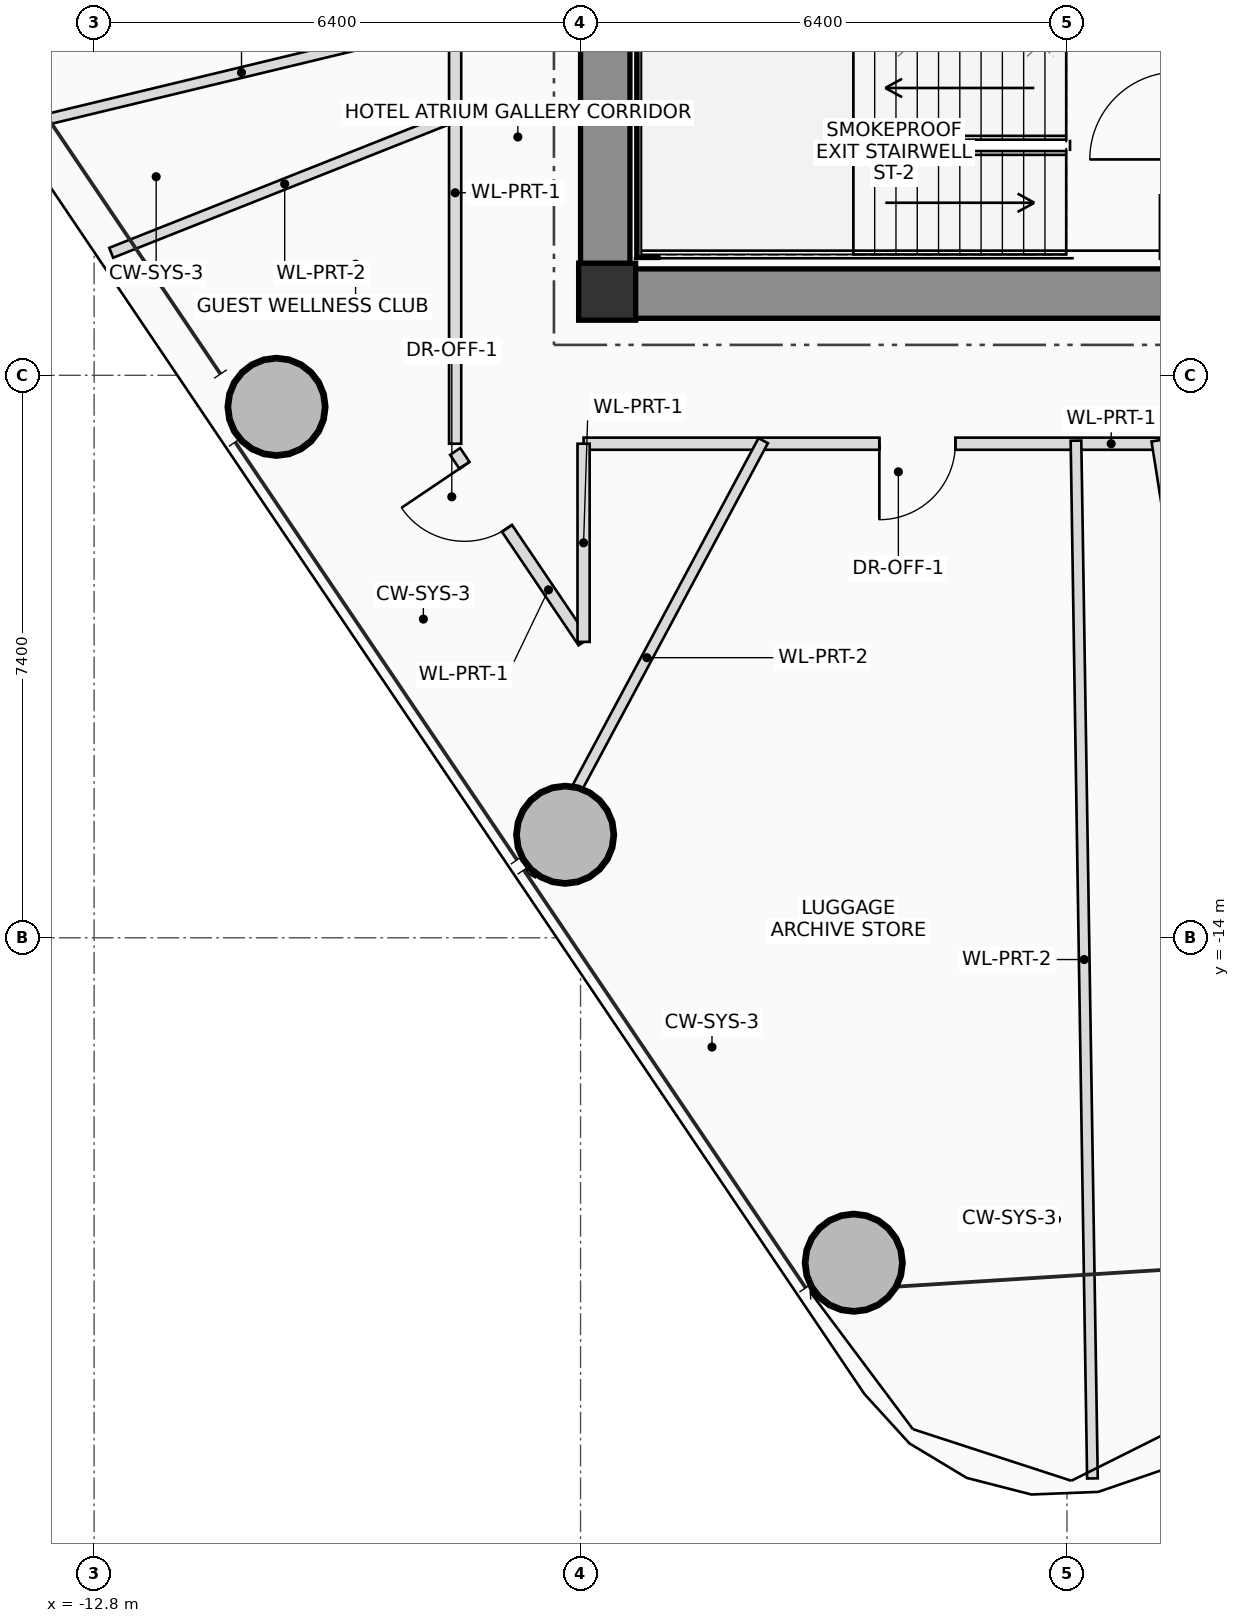
"""IFC4 building model, lengths in metres.
Left out: names, types, materials, properties, quantities, classifications, styles, units other than length and angle.
Written with IfcOpenShell. Run it as: python <this file> out.ifc"""

import sys

from ifc_helpers import new_model, si_unit, direction, frame, frame_2d, origin, origin_2d, place, context, subcontext, project, spatial, rectangle, hollow_circle, extrude, source, transform, mapped, element, fill, save


model = new_model("IFC4")
c1 = context("Model", 3, precision=1e-05, world=origin(), true_north=direction((0.0, 1.0)))
c2 = subcontext(c1, "Body", "Model", "MODEL_VIEW")
j1 = project(units=[si_unit("LENGTHUNIT", "METRE"), si_unit("PLANEANGLEUNIT", "RADIAN")], contexts=[c1])
p1 = place(None, origin())
s1 = spatial("IfcSite", under=j1, at=p1, CompositionType="ELEMENT")
p2 = place(p1, origin())
s2 = spatial("IfcBuilding", under=s1, at=p2, CompositionType="ELEMENT")
p3 = place(p2, frame((0.0, 0.0, 165.65)))
s3 = spatial("IfcBuildingStorey", under=s2, at=p3, CompositionType="ELEMENT", Elevation=165.65)
m1 = source(origin(), c2, "Body", "SweptSolid", [
    extrude(rectangle(XDim=0.75, YDim=0.75, at=origin_2d()), origin(), (0.0, 0.0, 1.0), 3.45),
])
p4 = place(p3, frame((-6.05, -5.5, 0.0), z_axis=(0.0, 0.0, 1.0), x_axis=(1.0, 0.0, 0.0)))
e1 = element("IfcColumn", 1, at=p4, inside=s3, PredefinedType="COLUMN", context=c2, shape_type="MappedRepresentation", body=[
    mapped(m1, transform((0.0, 0.0, 0.0), scale=1.0)),
])
p5 = place(p3, frame((-6.4, -5.525, 0.0), z_axis=(0.0, 0.0, 1.0), x_axis=(1.0, 0.0, 0.0)))
e2 = element("IfcWall", 2, at=p5, inside=s3, PredefinedType="SHEAR", context=c2, shape_type="SweptSolid", body=[
    extrude(rectangle(XDim=12.8, YDim=0.65, at=frame_2d((6.4, 0.0))), origin(), (0.0, 0.0, 1.0), 3.45),
])
p6 = place(p5, frame((8.6, 0.0, 0.0)))
e3 = element("IfcOpeningElement", 3, at=p6, cuts=e2, PredefinedType="OPENING", context=c2, shape_type="SweptSolid", body=[
    extrude(rectangle(XDim=1.2, YDim=2.2, at=frame_2d((0.6, 1.1))), frame((0.0, 0.335, 0.0), z_axis=(0.0, -1.0, 0.0), x_axis=(1.0, 0.0, 0.0)), (0.0, 0.0, 1.0), 0.67),
])
p7 = place(p3, frame((-6.075, -5.2, 0.0), z_axis=(0.0, 0.0, 1.0), x_axis=(0.0, 1.0, 0.0)))
e4 = element("IfcWall", 4, at=p7, inside=s3, PredefinedType="SHEAR", context=c2, shape_type="SweptSolid", body=[
    extrude(rectangle(XDim=3.45, YDim=0.65, at=frame_2d((1.725, 0.0))), origin(), (0.0, 0.0, 1.0), 3.45),
])
p8 = place(p3, frame((-5.52, -5.05, 0.0), z_axis=(0.0, 0.0, 1.0), x_axis=(0.0, 1.0, 0.0)))
e5 = element("IfcWall", 5, at=p8, inside=s3, PredefinedType="SHEAR", context=c2, shape_type="SweptSolid", body=[
    extrude(rectangle(XDim=2.75, YDim=0.28, at=frame_2d((1.375, 0.0))), origin(), (0.0, 0.0, 1.0), 3.45),
])
m2 = source(origin(), c2, "Body", "SweptSolid", [
    extrude(hollow_circle(Radius=0.65, WallThickness=0.045, at=origin_2d()), origin(), (0.0, 0.0, 1.0), 3.45),
])
for number, where, z_axis, x_axis in (
    (6, (-10.4, -7.015, 0.0), (0.0, 0.0, 1.0), (1.0, 0.0, 0.0)),
    (7, (-6.603, -12.645, 0.0), (0.0, 0.0, 1.0), (1.0, 0.0, 0.0)),
    (8, (-2.805, -18.275, 0.0), (0.0, 0.0, 1.0), (1.0, 0.0, 0.0)),
):
    element("IfcColumn", number, at=place(p3, frame(where, z_axis=z_axis, x_axis=x_axis)), inside=s3, PredefinedType="COLUMN", context=c2, shape_type="MappedRepresentation", body=[
        mapped(m2, transform((0.0, 0.0, 0.0), scale=1.0)),
    ])
p9 = place(p3, frame((-6.36, -10.107, 0.0), z_axis=(0.0, 0.0, 1.0), x_axis=(-0.559166202639, 0.829055581868, 0.0)))
e9 = element("IfcWall", 9, at=p9, inside=s3, PredefinedType="PARTITIONING", context=c2, shape_type="SweptSolid", body=[
    extrude(rectangle(XDim=3.022, YDim=0.16, at=frame_2d((1.511, 0.0))), origin(), (0.0, 0.0, 1.0), 2.605),
])
p10 = place(p9, frame((1.802, 0.0, 0.0)))
e10 = element("IfcOpeningElement", 10, at=p10, cuts=e9, PredefinedType="OPENING", context=c2, shape_type="SweptSolid", body=[
    extrude(rectangle(XDim=1.0, YDim=2.25, at=frame_2d((0.5, 1.125))), frame((0.0, 0.09, 0.0), z_axis=(0.0, -1.0, 0.0), x_axis=(1.0, 0.0, 0.0)), (0.0, 0.0, 1.0), 0.18),
])
p11 = place(p3, frame((-8.05, -7.5, 0.0), z_axis=(0.0, 0.0, 1.0), x_axis=(0.0, 1.0, 0.0)))
e11 = element("IfcWall", 11, at=p11, inside=s3, PredefinedType="PARTITIONING", context=c2, shape_type="SweptSolid", body=[
    extrude(rectangle(XDim=15.0, YDim=0.16, at=frame_2d((7.5, 0.0))), origin(), (0.0, 0.0, 1.0), 2.605),
])
p12 = place(p11, frame((6.753, 0.0, 0.0)))
e12 = element("IfcOpeningElement", 12, at=p12, cuts=e11, PredefinedType="OPENING", context=c2, shape_type="SweptSolid", body=[
    extrude(rectangle(XDim=1.05, YDim=2.2, at=frame_2d((0.525, 1.1))), frame((0.0, 0.09, 0.0), z_axis=(0.0, -1.0, 0.0), x_axis=(1.0, 0.0, 0.0)), (0.0, 0.0, 1.0), 0.18),
])
p13 = place(p11, frame((10.436, 0.0, 0.0)))
e13 = element("IfcOpeningElement", 13, at=p13, cuts=e11, PredefinedType="OPENING", context=c2, shape_type="SweptSolid", body=[
    extrude(rectangle(XDim=1.05, YDim=2.2, at=frame_2d((0.525, 1.1))), frame((0.0, 0.09, 0.0), z_axis=(0.0, -1.0, 0.0), x_axis=(1.0, 0.0, 0.0)), (0.0, 0.0, 1.0), 0.18),
])
p14 = place(p11, frame((13.78, 0.0, 0.0)))
e14 = element("IfcOpeningElement", 14, at=p14, cuts=e11, PredefinedType="OPENING", context=c2, shape_type="SweptSolid", body=[
    extrude(rectangle(XDim=1.0, YDim=2.25, at=frame_2d((0.5, 1.125))), frame((0.0, 0.09, 0.0), z_axis=(0.0, -1.0, 0.0), x_axis=(1.0, 0.0, 0.0)), (0.0, 0.0, 1.0), 0.18),
])
p15 = place(p3, frame((5.25, -7.5, 0.0), z_axis=(0.0, 0.0, 1.0), x_axis=(-1.0, 0.0, 0.0)))
e15 = element("IfcWall", 15, at=p15, inside=s3, PredefinedType="PARTITIONING", context=c2, shape_type="SweptSolid", body=[
    extrude(rectangle(XDim=11.61, YDim=0.16, at=frame_2d((5.805, 0.0))), origin(), (0.0, 0.0, 1.0), 2.605),
])
p16 = place(p15, frame((1.618, 0.0, 0.0)))
e16 = element("IfcOpeningElement", 16, at=p16, cuts=e15, PredefinedType="OPENING", context=c2, shape_type="SweptSolid", body=[
    extrude(rectangle(XDim=1.0, YDim=2.25, at=frame_2d((0.5, 1.125))), frame((0.0, 0.09, 0.0), z_axis=(0.0, -1.0, 0.0), x_axis=(1.0, 0.0, 0.0)), (0.0, 0.0, 1.0), 0.18),
])
p17 = place(p15, frame((6.719, 0.0, 0.0)))
e17 = element("IfcOpeningElement", 17, at=p17, cuts=e15, PredefinedType="OPENING", context=c2, shape_type="SweptSolid", body=[
    extrude(rectangle(XDim=1.0, YDim=2.25, at=frame_2d((0.5, 1.125))), frame((0.0, 0.09, 0.0), z_axis=(0.0, -1.0, 0.0), x_axis=(1.0, 0.0, 0.0)), (0.0, 0.0, 1.0), 0.18),
])
p18 = place(p3, frame((-6.36, -7.5, 0.0), z_axis=(0.0, 0.0, 1.0), x_axis=(0.0, -1.0, 0.0)))
e18 = element("IfcWall", 18, at=p18, inside=s3, PredefinedType="PARTITIONING", context=c2, shape_type="SweptSolid", body=[
    extrude(rectangle(XDim=2.607, YDim=0.16, at=frame_2d((1.304, 0.0))), origin(), (0.0, 0.0, 1.0), 2.605),
])
p19 = place(p3, frame((-8.01, -1.93, 0.0), z_axis=(0.0, 0.0, 1.0), x_axis=(-0.972178712373, -0.23424037058, 0.0)))
e19 = element("IfcWall", 19, at=p19, inside=s3, PredefinedType="PARTITIONING", context=c2, shape_type="SweptSolid", body=[
    extrude(rectangle(XDim=5.865, YDim=0.14, at=frame_2d((2.932, 0.0))), origin(), (0.0, 0.0, 1.0), 2.605),
])
p20 = place(p3, frame((-8.01, -3.177, 0.0), z_axis=(0.0, 0.0, 1.0), x_axis=(-0.929545887112, -0.368706446586, 0.0)))
e20 = element("IfcWall", 20, at=p20, inside=s3, PredefinedType="PARTITIONING", context=c2, shape_type="SweptSolid", body=[
    extrude(rectangle(XDim=4.911, YDim=0.14, at=frame_2d((2.456, 0.0))), origin(), (0.0, 0.0, 1.0), 2.605),
])
p21 = place(p3, frame((-3.997, -7.46, 0.0), z_axis=(0.0, 0.0, 1.0), x_axis=(-0.472255924341, -0.881461480681, 0.0)))
e21 = element("IfcWall", 21, at=p21, inside=s3, PredefinedType="PARTITIONING", context=c2, shape_type="SweptSolid", body=[
    extrude(rectangle(XDim=6.478, YDim=0.14, at=frame_2d((3.239, 0.0))), origin(), (0.0, 0.0, 1.0), 2.605),
])
p22 = place(p3, frame((0.118, -7.46, 0.0), z_axis=(0.0, 0.0, 1.0), x_axis=(0.015859383496, -0.999874232069, 0.0)))
e22 = element("IfcWall", 22, at=p22, inside=s3, PredefinedType="PARTITIONING", context=c2, shape_type="SweptSolid", body=[
    extrude(rectangle(XDim=13.655, YDim=0.14, at=frame_2d((6.827, 0.0))), origin(), (0.0, 0.0, 1.0), 2.765),
])
p23 = place(p3, frame((1.181, -7.46, 0.0), z_axis=(0.0, 0.0, 1.0), x_axis=(0.156458885844, -0.98768447241, 0.0)))
e23 = element("IfcWall", 23, at=p23, inside=s3, PredefinedType="PARTITIONING", context=c2, shape_type="SweptSolid", body=[
    extrude(rectangle(XDim=11.316, YDim=0.14, at=frame_2d((5.658, 0.0))), origin(), (0.0, 0.0, 1.0), 2.605),
])
p24 = place(p10, origin())
e24 = element("IfcDoor", 24, at=p24, inside=s3, OperationType="SINGLE_SWING_RIGHT", PredefinedType="DOOR", context=c2, shape_type="SweptSolid", body=[
    extrude(rectangle(XDim=1.0, YDim=2.25, at=frame_2d((0.5, 1.125))), frame((0.0, 0.025, 0.0), z_axis=(0.0, -1.0, 0.0), x_axis=(1.0, 0.0, 0.0)), (0.0, 0.0, 1.0), 0.05),
])
fill(e10, e24)
p25 = place(p17, origin())
e25 = element("IfcDoor", 25, at=p25, inside=s3, OperationType="SINGLE_SWING_RIGHT", PredefinedType="DOOR", context=c2, shape_type="SweptSolid", body=[
    extrude(rectangle(XDim=1.0, YDim=2.25, at=frame_2d((0.5, 1.125))), frame((0.0, 0.025, 0.0), z_axis=(0.0, -1.0, 0.0), x_axis=(1.0, 0.0, 0.0)), (0.0, 0.0, 1.0), 0.05),
])
fill(e17, e25)
save(model, sys.argv[1])
